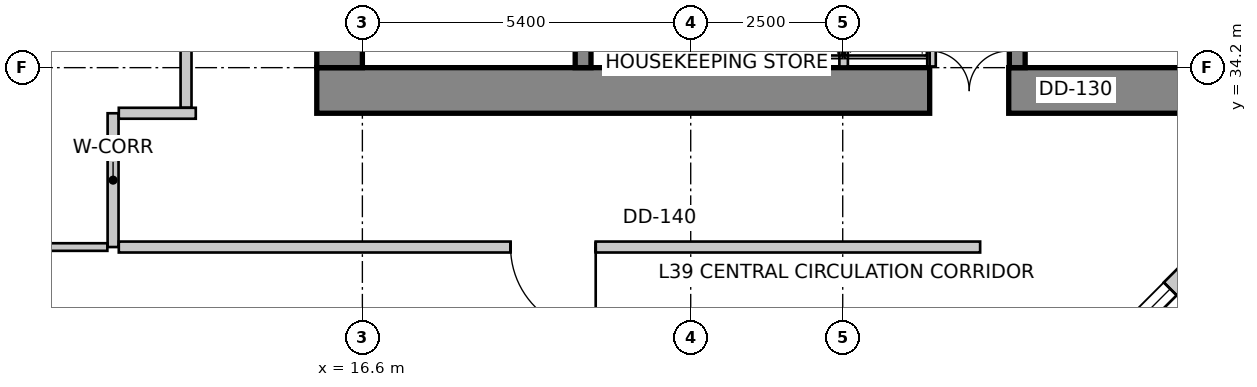
"""IFC4 building model, lengths in metres.
Left out: names, types, materials, properties, quantities, classifications, styles, units other than length and angle.
Written with IfcOpenShell. Run it as: python <this file> out.ifc"""

import sys

from ifc_helpers import new_model, si_unit, direction, frame, frame_2d, origin, place, context, subcontext, project, spatial, rectangle, extrude, source, transform, mapped, element, fill, save


model = new_model("IFC4")
c1 = context("Model", 3, precision=1e-05, world=origin(), true_north=direction((0.0, 1.0)))
c2 = subcontext(c1, "Body", "Model", "MODEL_VIEW")
j1 = project(units=[si_unit("LENGTHUNIT", "METRE"), si_unit("PLANEANGLEUNIT", "RADIAN")], contexts=[c1])
p1 = place(None, origin())
s1 = spatial("IfcSite", under=j1, at=p1, CompositionType="ELEMENT")
p2 = place(p1, origin())
s2 = spatial("IfcBuilding", under=s1, at=p2, CompositionType="ELEMENT")
p3 = place(p2, frame((0.0, 0.0, 157.4)))
s3 = spatial("IfcBuildingStorey", under=s2, at=p3, CompositionType="ELEMENT", Elevation=157.4)
p4 = place(p3, frame((15.85, 33.825, 0.0), z_axis=(0.0, 0.0, 1.0), x_axis=(1.0, 0.0, 0.0)))
e1 = element("IfcWall", 1, at=p4, inside=s3, PredefinedType="SHEAR", context=c2, shape_type="SweptSolid", body=[
    extrude(rectangle(XDim=15.9, YDim=0.75, at=frame_2d((7.95, 0.0))), origin(), (0.0, 0.0, 1.0), 3.6),
])
m1 = source(origin(), c2, "Body", "SweptSolid", [
    extrude(rectangle(XDim=1.3, YDim=2.15, at=frame_2d((0.65, 1.075))), frame((0.0, 0.385, 0.0), z_axis=(0.0, -1.0, 0.0), x_axis=(1.0, 0.0, 0.0)), (0.0, 0.0, 1.0), 0.77),
])
p5 = place(p4, frame((10.08, 0.0, 0.0)))
e2 = element("IfcOpeningElement", 2, at=p5, cuts=e1, PredefinedType="OPENING", context=c2, shape_type="MappedRepresentation", body=[
    mapped(m1, transform((0.0, 0.0, 0.0), scale=1.0)),
])
p6 = place(p3, frame((16.225, 34.2, 0.0), z_axis=(0.0, 0.0, 1.0), x_axis=(0.0, 1.0, 0.0)))
e3 = element("IfcWall", 3, at=p6, inside=s3, PredefinedType="SHEAR", context=c2, shape_type="SweptSolid", body=[
    extrude(rectangle(XDim=11.4, YDim=0.75, at=frame_2d((5.7, 0.0))), origin(), (0.0, 0.0, 1.0), 3.6),
])
m2 = source(origin(), c2, "Body", "SweptSolid", [
    extrude(rectangle(XDim=1.1, YDim=2.15, at=frame_2d((0.55, 1.075))), frame((0.0, 0.385, 0.0), z_axis=(0.0, -1.0, 0.0), x_axis=(1.0, 0.0, 0.0)), (0.0, 0.0, 1.0), 0.77),
])
p7 = place(p6, frame((7.15, 0.0, 0.0)))
e4 = element("IfcOpeningElement", 4, at=p7, cuts=e3, PredefinedType="OPENING", context=c2, shape_type="MappedRepresentation", body=[
    mapped(m2, transform((0.0, 0.0, 0.0), scale=1.0)),
])
p8 = place(p3, frame((20.23, 34.2, 0.0), z_axis=(0.0, 0.0, 1.0), x_axis=(0.0, 1.0, 0.0)))
e5 = element("IfcWall", 5, at=p8, inside=s3, PredefinedType="SHEAR", context=c2, shape_type="SweptSolid", body=[
    extrude(rectangle(XDim=9.06, YDim=0.26, at=frame_2d((4.53, 0.0))), origin(), (0.0, 0.0, 1.0), 3.6),
])
m3 = source(origin(), c2, "Body", "SweptSolid", [
    extrude(rectangle(XDim=1.1, YDim=2.15, at=frame_2d((0.55, 1.075))), frame((0.0, 0.14, 0.0), z_axis=(0.0, -1.0, 0.0), x_axis=(1.0, 0.0, 0.0)), (0.0, 0.0, 1.0), 0.28),
])
p9 = place(p8, frame((7.45, 0.0, 0.0)))
e6 = element("IfcOpeningElement", 6, at=p9, cuts=e5, PredefinedType="OPENING", context=c2, shape_type="MappedRepresentation", body=[
    mapped(m3, transform((0.0, 0.0, 0.0), scale=1.0)),
])
p10 = place(p3, frame((27.37, 34.2, 0.0), z_axis=(0.0, 0.0, 1.0), x_axis=(0.0, 1.0, 0.0)))
e7 = element("IfcWall", 7, at=p10, inside=s3, PredefinedType="SHEAR", context=c2, shape_type="SweptSolid", body=[
    extrude(rectangle(XDim=9.06, YDim=0.26, at=frame_2d((4.53, 0.0))), origin(), (0.0, 0.0, 1.0), 3.6),
])
p11 = place(p10, frame((7.45, 0.0, 0.0)))
e8 = element("IfcOpeningElement", 8, at=p11, cuts=e7, PredefinedType="OPENING", context=c2, shape_type="MappedRepresentation", body=[
    mapped(m3, transform((0.0, 0.0, 0.0), scale=1.0)),
])
p12 = place(p3, frame((28.116, 28.792, 0.0), z_axis=(0.0, 0.0, 1.0), x_axis=(0.707064797706, 0.707148762175, 0.0)))
e9 = element("IfcWall", 9, at=p12, inside=s3, PredefinedType="SOLIDWALL", context=c2, shape_type="SweptSolid", body=[
    extrude(rectangle(XDim=2.908, YDim=0.3, at=frame_2d((1.454, 0.0))), origin(), (0.0, 0.0, 1.0), 3.35),
])
m4 = source(origin(), c2, "Body", "SweptSolid", [
    extrude(rectangle(XDim=2.1, YDim=2.0, at=frame_2d((1.05, 1.0))), frame((0.0, 0.16, 0.0), z_axis=(0.0, -1.0, 0.0), x_axis=(1.0, 0.0, 0.0)), (0.0, 0.0, 1.0), 0.32),
])
p13 = place(p12, frame((0.404, 0.0, 0.85)))
e10 = element("IfcOpeningElement", 10, at=p13, cuts=e9, PredefinedType="OPENING", context=c2, shape_type="MappedRepresentation", body=[
    mapped(m4, transform((0.0, 0.0, 0.0), scale=1.0)),
])
p14 = place(p3, frame((13.269, 47.134, 0.0), z_axis=(0.0, 0.0, 1.0), x_axis=(-0.319929773322, -0.947441259468, 0.0)))
e11 = element("IfcWall", 11, at=p14, inside=s3, PredefinedType="SOLIDWALL", context=c2, shape_type="SweptSolid", body=[
    extrude(rectangle(XDim=16.134, YDim=0.3, at=frame_2d((8.067, 0.0))), origin(), (0.0, 0.0, 1.0), 3.35),
])
p15 = place(p14, frame((2.426, 0.0, 0.85)))
e12 = element("IfcOpeningElement", 12, at=p15, cuts=e11, PredefinedType="OPENING", context=c2, shape_type="MappedRepresentation", body=[
    mapped(m4, transform((0.0, 0.0, 0.0), scale=1.0)),
])
m5 = source(origin(), c2, "Body", "SweptSolid", [
    extrude(rectangle(XDim=2.4, YDim=2.2, at=frame_2d((1.2, 1.1))), frame((0.0, 0.16, 0.0), z_axis=(0.0, -1.0, 0.0), x_axis=(1.0, 0.0, 0.0)), (0.0, 0.0, 1.0), 0.32),
])
p16 = place(p14, frame((7.211, 0.0, 0.85)))
e13 = element("IfcOpeningElement", 13, at=p16, cuts=e11, PredefinedType="OPENING", context=c2, shape_type="MappedRepresentation", body=[
    mapped(m5, transform((0.0, 0.0, 0.0), scale=1.0)),
])
p17 = place(p14, frame((12.296, 0.0, 0.85)))
e14 = element("IfcOpeningElement", 14, at=p17, cuts=e11, PredefinedType="OPENING", context=c2, shape_type="MappedRepresentation", body=[
    mapped(m4, transform((0.0, 0.0, 0.0), scale=1.0)),
])
p18 = place(p3, frame((8.187, 31.834, 0.0), z_axis=(0.0, 0.0, 1.0), x_axis=(0.198869838988, -0.980025911464, 0.0)))
e15 = element("IfcWall", 15, at=p18, inside=s3, PredefinedType="SOLIDWALL", context=c2, shape_type="SweptSolid", body=[
    extrude(rectangle(XDim=16.363, YDim=0.3, at=frame_2d((8.182, 0.0))), origin(), (0.0, 0.0, 1.0), 3.35),
])
m6 = source(origin(), c2, "Body", "SweptSolid", [
    extrude(rectangle(XDim=1.6, YDim=2.15, at=frame_2d((0.8, 1.075))), frame((0.0, 0.16, 0.0), z_axis=(0.0, -1.0, 0.0), x_axis=(1.0, 0.0, 0.0)), (0.0, 0.0, 1.0), 0.32),
])
p19 = place(p18, frame((9.459, 0.0, 0.0)))
e16 = element("IfcOpeningElement", 16, at=p19, cuts=e15, PredefinedType="OPENING", context=c2, shape_type="MappedRepresentation", body=[
    mapped(m6, transform((0.0, 0.0, 0.0), scale=1.0)),
])
p20 = place(p18, frame((3.809, 0.0, 0.85)))
e17 = element("IfcOpeningElement", 17, at=p20, cuts=e15, PredefinedType="OPENING", context=c2, shape_type="MappedRepresentation", body=[
    mapped(m5, transform((0.0, 0.0, 0.0), scale=1.0)),
])
p21 = place(p18, frame((13.236, 0.0, 0.85)))
e18 = element("IfcOpeningElement", 18, at=p21, cuts=e15, PredefinedType="OPENING", context=c2, shape_type="MappedRepresentation", body=[
    mapped(m5, transform((0.0, 0.0, 0.0), scale=1.0)),
])
for number, where, z_axis, x_axis in (
    (19, (25.96, 34.22, 0.0), (0.0, 0.0, 1.0), (0.0, 1.0, 0.0)),
    (20, (23.07, 34.22, 0.0), (0.0, 0.0, 1.0), (0.0, 1.0, 0.0)),
    (21, (24.515, 34.22, 0.0), (0.0, 0.0, 1.0), (0.0, 1.0, 0.0)),
):
    element("IfcWall", number, at=place(p3, frame(where, z_axis=z_axis, x_axis=x_axis)), inside=s3, PredefinedType="SOLIDWALL", context=c2, shape_type="SweptSolid", body=[
        extrude(rectangle(XDim=1.62, YDim=0.14, at=frame_2d((0.81, 0.0))), origin(), (0.0, 0.0, 1.0), 2.642),
    ])
p22 = place(p3, frame((12.5, 31.25, 0.0), z_axis=(0.0, 0.0, 1.0), x_axis=(0.0, 1.0, 0.0)))
e22 = element("IfcWall", 22, at=p22, inside=s3, PredefinedType="PARTITIONING", context=c2, shape_type="SweptSolid", body=[
    extrude(rectangle(XDim=2.2, YDim=0.18, at=frame_2d((1.1, 0.0))), origin(), (0.0, 0.0, 1.0), 2.935),
])
p23 = place(p3, frame((12.594, 33.45, 0.0), z_axis=(0.0, 0.0, 1.0), x_axis=(1.0, 0.0, 0.0)))
e23 = element("IfcWall", 23, at=p23, inside=s3, PredefinedType="PARTITIONING", context=c2, shape_type="SweptSolid", body=[
    extrude(rectangle(XDim=1.266, YDim=0.18, at=frame_2d((0.633, 0.0))), origin(), (0.0, 0.0, 1.0), 3.35),
])
p24 = place(p3, frame((26.76, 31.25, 0.0), z_axis=(0.0, 0.0, 1.0), x_axis=(-1.0, 0.0, 0.0)))
e24 = element("IfcWall", 24, at=p24, inside=s3, PredefinedType="PARTITIONING", context=c2, shape_type="SweptSolid", body=[
    extrude(rectangle(XDim=14.166, YDim=0.18, at=frame_2d((7.083, 0.0))), origin(), (0.0, 0.0, 1.0), 2.935),
])
m7 = source(origin(), c2, "Body", "SweptSolid", [
    extrude(rectangle(XDim=1.4, YDim=2.15, at=frame_2d((0.7, 1.075))), frame((0.0, 0.1, 0.0), z_axis=(0.0, -1.0, 0.0), x_axis=(1.0, 0.0, 0.0)), (0.0, 0.0, 1.0), 0.2),
])
p25 = place(p24, frame((6.323, 0.0, 0.0)))
e25 = element("IfcOpeningElement", 25, at=p25, cuts=e24, PredefinedType="OPENING", context=c2, shape_type="MappedRepresentation", body=[
    mapped(m7, transform((0.0, 0.0, 0.0), scale=1.0)),
])
p26 = place(p3, frame((13.7, 33.544, 0.0), z_axis=(0.0, 0.0, 1.0), x_axis=(0.0, 1.0, 0.0)))
e26 = element("IfcWall", 26, at=p26, inside=s3, PredefinedType="PARTITIONING", context=c2, shape_type="SweptSolid", body=[
    extrude(rectangle(XDim=13.86, YDim=0.18, at=frame_2d((6.93, 0.0))), origin(), (0.0, 0.0, 1.0), 2.492),
])
m8 = source(origin(), c2, "Body", "SweptSolid", [
    extrude(rectangle(XDim=0.9, YDim=2.15, at=frame_2d((0.45, 1.075))), frame((0.0, 0.1, 0.0), z_axis=(0.0, -1.0, 0.0), x_axis=(1.0, 0.0, 0.0)), (0.0, 0.0, 1.0), 0.2),
])
p27 = place(p26, frame((4.253, 0.0, 0.0)))
e27 = element("IfcOpeningElement", 27, at=p27, cuts=e26, PredefinedType="OPENING", context=c2, shape_type="MappedRepresentation", body=[
    mapped(m8, transform((0.0, 0.0, 0.0), scale=1.0)),
])
p28 = place(p3, frame((12.406, 31.25, 0.0), z_axis=(0.0, 0.0, 1.0), x_axis=(-1.0, 0.0, 0.0)))
e28 = element("IfcWall", 28, at=p28, inside=s3, PredefinedType="PARTITIONING", context=c2, shape_type="SweptSolid", body=[
    extrude(rectangle(XDim=3.983, YDim=0.125, at=frame_2d((1.992, 0.0))), origin(), (0.0, 0.0, 1.0), 2.492),
])
m9 = source(origin(), c2, "Body", "SweptSolid", [
    extrude(rectangle(XDim=2.1, YDim=2.0, at=frame_2d((1.05, 1.0))), frame((0.0, -0.015, 0.0), z_axis=(0.0, -1.0, 0.0), x_axis=(1.0, 0.0, 0.0)), (0.0, 0.0, 1.0), 0.06),
])
p29 = place(p13, origin())
e29 = element("IfcWindow", 29, at=p29, inside=s3, PartitioningType="SINGLE_PANEL", PredefinedType="WINDOW", context=c2, shape_type="MappedRepresentation", body=[
    mapped(m9, transform((0.0, 0.0, 0.0), scale=1.0)),
])
fill(e10, e29)
m10 = source(origin(), c2, "Body", "SweptSolid", [
    extrude(rectangle(XDim=1.3, YDim=2.15, at=frame_2d((0.65, 1.075))), frame((0.0, 0.025, 0.0), z_axis=(0.0, -1.0, 0.0), x_axis=(1.0, 0.0, 0.0)), (0.0, 0.0, 1.0), 0.05),
])
p30 = place(p5, origin())
e30 = element("IfcDoor", 30, at=p30, inside=s3, OperationType="DOUBLE_DOOR_SINGLE_SWING", PredefinedType="DOOR", context=c2, shape_type="MappedRepresentation", body=[
    mapped(m10, transform((0.0, 0.0, 0.0), scale=1.0)),
])
fill(e2, e30)
m11 = source(origin(), c2, "Body", "SweptSolid", [
    extrude(rectangle(XDim=1.4, YDim=2.15, at=frame_2d((0.7, 1.075))), frame((0.0, 0.025, 0.0), z_axis=(0.0, -1.0, 0.0), x_axis=(1.0, 0.0, 0.0)), (0.0, 0.0, 1.0), 0.05),
])
p31 = place(p25, origin())
e31 = element("IfcDoor", 31, at=p31, inside=s3, OperationType="SINGLE_SWING_LEFT", PredefinedType="DOOR", context=c2, shape_type="MappedRepresentation", body=[
    mapped(m11, transform((0.0, 0.0, 0.0), scale=1.0)),
])
fill(e25, e31)
save(model, sys.argv[1])
